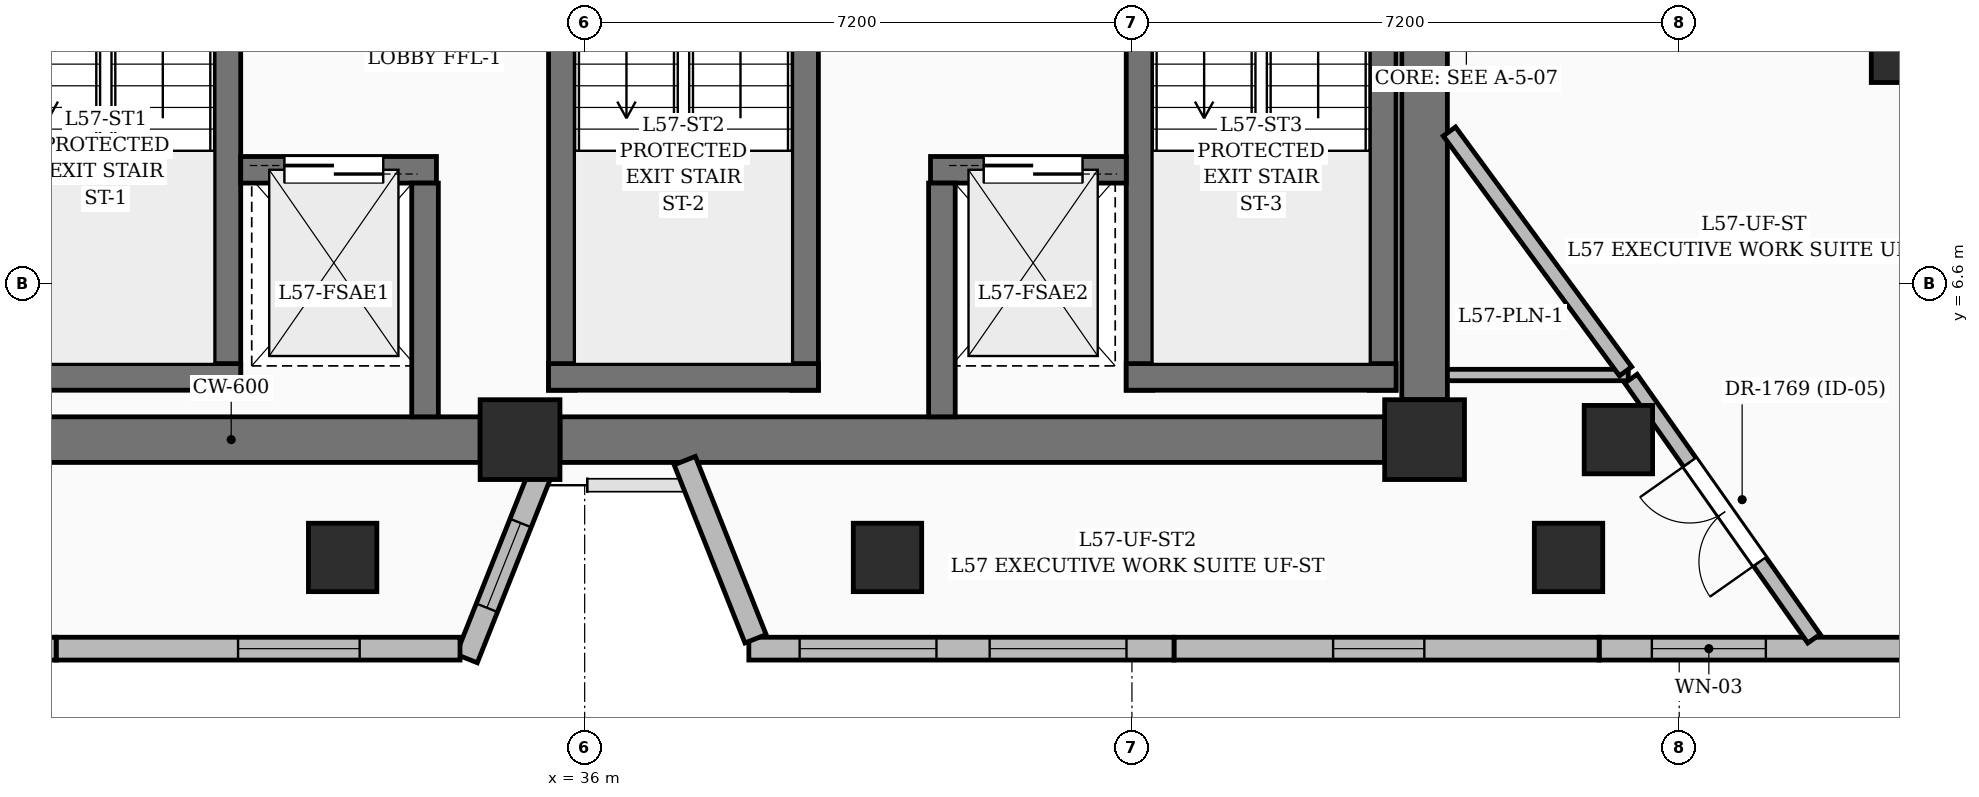
"""IFC4 building model, lengths in metres.
Left out: names, types, materials, properties, quantities, classifications, styles, units other than length and angle.
Written with IfcOpenShell. Run it as: python <this file> out.ifc"""

import sys

from ifc_helpers import new_model, si_unit, direction, frame, frame_2d, origin, origin_2d, place, context, subcontext, project, spatial, rectangle, extrude, element, fill, save


model = new_model("IFC4")
c1 = context("Model", 3, precision=1e-05, world=origin(), true_north=direction((0.0, 1.0)))
c2 = subcontext(c1, "Body", "Model", "MODEL_VIEW")
j1 = project(units=[si_unit("LENGTHUNIT", "METRE"), si_unit("PLANEANGLEUNIT", "RADIAN")], contexts=[c1])
p1 = place(None, origin())
s1 = spatial("IfcSite", under=j1, at=p1, CompositionType="ELEMENT")
p2 = place(p1, origin())
s2 = spatial("IfcBuilding", under=s1, at=p2, CompositionType="ELEMENT")
p3 = place(p2, frame((0.0, 0.0, 222.0)))
s3 = spatial("IfcBuildingStorey", under=s2, at=p3, CompositionType="ELEMENT", Elevation=222.0)
for number, where, z_axis, x_axis in (
    (1, (35.15, 4.55, 0.0), (0.0, 0.0, 1.0), (1.0, 0.0, 0.0)),
    (2, (47.05, 4.55, 0.0), (0.0, 0.0, 1.0), (1.0, 0.0, 0.0)),
):
    element("IfcColumn", number, at=place(p3, frame(where, z_axis=z_axis, x_axis=x_axis)), inside=s3, PredefinedType="COLUMN", context=c2, shape_type="SweptSolid", body=[
        extrude(rectangle(XDim=1.05, YDim=1.05, at=origin_2d()), origin(), (0.0, 0.0, 1.0), 3.75),
    ])
p4 = place(p3, frame((49.6, 4.55, 0.0), z_axis=(0.0, 0.0, 1.0), x_axis=(1.0, 0.0, 0.0)))
e3 = element("IfcColumn", 3, at=p4, inside=s3, PredefinedType="COLUMN", context=c2, shape_type="SweptSolid", body=[
    extrude(rectangle(XDim=0.9, YDim=0.9, at=origin_2d()), origin(), (0.0, 0.0, 1.0), 3.75),
])
p5 = place(p3, frame((28.075, 4.55, 0.0), z_axis=(0.0, 0.0, 1.0), x_axis=(1.0, 0.0, 0.0)))
e4 = element("IfcWall", 4, at=p5, inside=s3, PredefinedType="SHEAR", context=c2, shape_type="SweptSolid", body=[
    extrude(rectangle(XDim=6.55, YDim=0.6, at=frame_2d((3.275, 0.0))), origin(), (0.0, 0.0, 1.0), 3.75),
])
p6 = place(p3, frame((35.675, 4.55, 0.0), z_axis=(0.0, 0.0, 1.0), x_axis=(1.0, 0.0, 0.0)))
e5 = element("IfcWall", 5, at=p6, inside=s3, PredefinedType="SHEAR", context=c2, shape_type="SweptSolid", body=[
    extrude(rectangle(XDim=10.85, YDim=0.6, at=frame_2d((5.425, 0.0))), origin(), (0.0, 0.0, 1.0), 3.75),
])
p7 = place(p3, frame((47.05, 5.075, 0.0), z_axis=(0.0, 0.0, 1.0), x_axis=(0.0, 1.0, 0.0)))
e6 = element("IfcWall", 6, at=p7, inside=s3, PredefinedType="SHEAR", context=c2, shape_type="SweptSolid", body=[
    extrude(rectangle(XDim=9.15, YDim=0.6, at=frame_2d((4.575, 0.0))), origin(), (0.0, 0.0, 1.0), 3.75),
])
p8 = place(p3, frame((31.3, 5.2, 0.0), z_axis=(0.0, 0.0, 1.0), x_axis=(0.0, 1.0, 0.0)))
e7 = element("IfcWall", 7, at=p8, inside=s3, PredefinedType="SOLIDWALL", context=c2, shape_type="SweptSolid", body=[
    extrude(rectangle(XDim=9.25, YDim=0.35, at=frame_2d((4.625, 0.0))), origin(), (0.0, 0.0, 1.0), 3.75),
])
p9 = place(p8, frame((6.02, 0.0, 0.0)))
e8 = element("IfcOpeningElement", 8, at=p9, cuts=e7, PredefinedType="OPENING", context=c2, shape_type="SweptSolid", body=[
    extrude(rectangle(XDim=1.0, YDim=2.15, at=frame_2d((0.5, 1.075))), frame((0.0, 0.185, 0.0), z_axis=(0.0, -1.0, 0.0), x_axis=(1.0, 0.0, 0.0)), (0.0, 0.0, 1.0), 0.37),
])
p10 = place(p3, frame((27.925, 5.375, 0.0), z_axis=(0.0, 0.0, 1.0), x_axis=(1.0, 0.0, 0.0)))
e9 = element("IfcWall", 9, at=p10, inside=s3, PredefinedType="SOLIDWALL", context=c2, shape_type="SweptSolid", body=[
    extrude(rectangle(XDim=3.55, YDim=0.35, at=frame_2d((1.775, 0.0))), origin(), (0.0, 0.0, 1.0), 3.75),
])
p11 = place(p3, frame((35.7, 5.2, 0.0), z_axis=(0.0, 0.0, 1.0), x_axis=(0.0, 1.0, 0.0)))
e10 = element("IfcWall", 10, at=p11, inside=s3, PredefinedType="SOLIDWALL", context=c2, shape_type="SweptSolid", body=[
    extrude(rectangle(XDim=9.25, YDim=0.35, at=frame_2d((4.625, 0.0))), origin(), (0.0, 0.0, 1.0), 3.75),
])
p12 = place(p11, frame((6.02, 0.0, 0.0)))
e11 = element("IfcOpeningElement", 11, at=p12, cuts=e10, PredefinedType="OPENING", context=c2, shape_type="SweptSolid", body=[
    extrude(rectangle(XDim=1.0, YDim=2.15, at=frame_2d((0.5, 1.075))), frame((0.0, 0.185, 0.0), z_axis=(0.0, -1.0, 0.0), x_axis=(1.0, 0.0, 0.0)), (0.0, 0.0, 1.0), 0.37),
])
p13 = place(p3, frame((38.9, 5.2, 0.0), z_axis=(0.0, 0.0, 1.0), x_axis=(0.0, 1.0, 0.0)))
e12 = element("IfcWall", 12, at=p13, inside=s3, PredefinedType="SOLIDWALL", context=c2, shape_type="SweptSolid", body=[
    extrude(rectangle(XDim=9.25, YDim=0.35, at=frame_2d((4.625, 0.0))), origin(), (0.0, 0.0, 1.0), 3.75),
])
p14 = place(p13, frame((6.02, 0.0, 0.0)))
e13 = element("IfcOpeningElement", 13, at=p14, cuts=e12, PredefinedType="OPENING", context=c2, shape_type="SweptSolid", body=[
    extrude(rectangle(XDim=1.0, YDim=2.15, at=frame_2d((0.5, 1.075))), frame((0.0, 0.185, 0.0), z_axis=(0.0, -1.0, 0.0), x_axis=(1.0, 0.0, 0.0)), (0.0, 0.0, 1.0), 0.37),
])
p15 = place(p3, frame((35.525, 5.375, 0.0), z_axis=(0.0, 0.0, 1.0), x_axis=(1.0, 0.0, 0.0)))
e14 = element("IfcWall", 14, at=p15, inside=s3, PredefinedType="SOLIDWALL", context=c2, shape_type="SweptSolid", body=[
    extrude(rectangle(XDim=3.55, YDim=0.35, at=frame_2d((1.775, 0.0))), origin(), (0.0, 0.0, 1.0), 3.75),
])
p16 = place(p3, frame((43.3, 5.2, 0.0), z_axis=(0.0, 0.0, 1.0), x_axis=(0.0, 1.0, 0.0)))
e15 = element("IfcWall", 15, at=p16, inside=s3, PredefinedType="SOLIDWALL", context=c2, shape_type="SweptSolid", body=[
    extrude(rectangle(XDim=9.25, YDim=0.35, at=frame_2d((4.625, 0.0))), origin(), (0.0, 0.0, 1.0), 3.75),
])
p17 = place(p16, frame((6.02, 0.0, 0.0)))
e16 = element("IfcOpeningElement", 16, at=p17, cuts=e15, PredefinedType="OPENING", context=c2, shape_type="SweptSolid", body=[
    extrude(rectangle(XDim=1.0, YDim=2.15, at=frame_2d((0.5, 1.075))), frame((0.0, 0.185, 0.0), z_axis=(0.0, -1.0, 0.0), x_axis=(1.0, 0.0, 0.0)), (0.0, 0.0, 1.0), 0.37),
])
p18 = place(p3, frame((46.5, 5.2, 0.0), z_axis=(0.0, 0.0, 1.0), x_axis=(0.0, 1.0, 0.0)))
e17 = element("IfcWall", 17, at=p18, inside=s3, PredefinedType="SOLIDWALL", context=c2, shape_type="SweptSolid", body=[
    extrude(rectangle(XDim=9.25, YDim=0.35, at=frame_2d((4.625, 0.0))), origin(), (0.0, 0.0, 1.0), 3.75),
])
p19 = place(p3, frame((43.125, 5.375, 0.0), z_axis=(0.0, 0.0, 1.0), x_axis=(1.0, 0.0, 0.0)))
e18 = element("IfcWall", 18, at=p19, inside=s3, PredefinedType="SOLIDWALL", context=c2, shape_type="SweptSolid", body=[
    extrude(rectangle(XDim=3.55, YDim=0.35, at=frame_2d((1.775, 0.0))), origin(), (0.0, 0.0, 1.0), 3.75),
])
p20 = place(p3, frame((31.475, 8.1, 0.0), z_axis=(0.0, 0.0, 1.0), x_axis=(1.0, 0.0, 0.0)))
e19 = element("IfcWall", 19, at=p20, inside=s3, PredefinedType="SOLIDWALL", context=c2, shape_type="SweptSolid", body=[
    extrude(rectangle(XDim=2.575, YDim=0.35, at=frame_2d((1.288, 0.0))), origin(), (0.0, 0.0, 1.0), 3.75),
])
p21 = place(p20, frame((0.575, 0.0, 0.0)))
e20 = element("IfcOpeningElement", 20, at=p21, cuts=e19, PredefinedType="OPENING", context=c2, shape_type="SweptSolid", body=[
    extrude(rectangle(XDim=1.3, YDim=2.25, at=frame_2d((0.65, 1.125))), frame((0.0, 0.185, 0.0), z_axis=(0.0, -1.0, 0.0), x_axis=(1.0, 0.0, 0.0)), (0.0, 0.0, 1.0), 0.37),
])
p22 = place(p3, frame((40.55, 8.1, 0.0), z_axis=(0.0, 0.0, 1.0), x_axis=(1.0, 0.0, 0.0)))
e21 = element("IfcWall", 21, at=p22, inside=s3, PredefinedType="SOLIDWALL", context=c2, shape_type="SweptSolid", body=[
    extrude(rectangle(XDim=2.575, YDim=0.35, at=frame_2d((1.288, 0.0))), origin(), (0.0, 0.0, 1.0), 3.75),
])
p23 = place(p22, frame((0.7, 0.0, 0.0)))
e22 = element("IfcOpeningElement", 22, at=p23, cuts=e21, PredefinedType="OPENING", context=c2, shape_type="SweptSolid", body=[
    extrude(rectangle(XDim=1.3, YDim=2.25, at=frame_2d((0.65, 1.125))), frame((0.0, 0.185, 0.0), z_axis=(0.0, -1.0, 0.0), x_axis=(1.0, 0.0, 0.0)), (0.0, 0.0, 1.0), 0.37),
])
for number, where, z_axis, x_axis in (
    (23, (33.9, 4.85, 0.0), (0.0, 0.0, 1.0), (0.0, 1.0, 0.0)),
    (24, (40.7, 4.85, 0.0), (0.0, 0.0, 1.0), (0.0, 1.0, 0.0)),
):
    element("IfcWall", number, at=place(p3, frame(where, z_axis=z_axis, x_axis=x_axis)), inside=s3, PredefinedType="SOLIDWALL", context=c2, shape_type="SweptSolid", body=[
        extrude(rectangle(XDim=3.075, YDim=0.35, at=frame_2d((1.538, 0.0))), origin(), (0.0, 0.0, 1.0), 3.75),
    ])
for number, where, z_axis, x_axis in (
    (25, (32.816, 3.0, 0.0), (0.0, 0.0, 1.0), (1.0, 0.0, 0.0)),
    (26, (39.984, 3.0, 0.0), (0.0, 0.0, 1.0), (1.0, 0.0, 0.0)),
    (27, (48.944, 3.0, 0.0), (0.0, 0.0, 1.0), (1.0, 0.0, 0.0)),
    (28, (53.377, 9.698, 0.0), (0.0, 0.0, 1.0), (1.0, 0.0, 0.0)),
):
    element("IfcColumn", number, at=place(p3, frame(where, z_axis=z_axis, x_axis=x_axis)), inside=s3, PredefinedType="COLUMN", context=c2, shape_type="SweptSolid", body=[
        extrude(rectangle(XDim=0.9, YDim=0.9, at=origin_2d()), origin(), (0.0, 0.0, 1.0), 3.75),
    ])
p24 = place(p3, frame((53.369, 12.333, 0.0), z_axis=(0.0, 0.0, 1.0), x_axis=(0.45831213698, -0.888791305705, 0.0)))
e29 = element("IfcWall", 29, at=p24, inside=s3, PredefinedType="SOLIDWALL", context=c2, shape_type="SweptSolid", body=[
    extrude(rectangle(XDim=7.991, YDim=0.3, at=frame_2d((3.996, 0.0))), origin(), (0.0, 0.0, 1.0), 3.5),
])
p25 = place(p24, frame((3.05, 0.0, 0.8)))
e30 = element("IfcOpeningElement", 30, at=p25, cuts=e29, PredefinedType="OPENING", context=c2, shape_type="SweptSolid", body=[
    extrude(rectangle(XDim=1.2, YDim=1.8, at=frame_2d((0.6, 0.9))), frame((0.0, 0.16, 0.0), z_axis=(0.0, -1.0, 0.0), x_axis=(1.0, 0.0, 0.0)), (0.0, 0.0, 1.0), 0.32),
])
p26 = place(p3, frame((54.36, 1.8, 0.0), z_axis=(0.0, 0.0, 1.0), x_axis=(-1.0, 0.0, 0.0)))
e31 = element("IfcWall", 31, at=p26, inside=s3, PredefinedType="SOLIDWALL", context=c2, shape_type="SweptSolid", body=[
    extrude(rectangle(XDim=5.013, YDim=0.3, at=frame_2d((2.507, 0.0))), origin(), (0.0, 0.0, 1.0), 3.5),
])
p27 = place(p26, frame((2.82, 0.0, 0.6)))
e32 = element("IfcOpeningElement", 32, at=p27, cuts=e31, PredefinedType="OPENING", context=c2, shape_type="SweptSolid", body=[
    extrude(rectangle(XDim=1.5, YDim=2.1, at=frame_2d((0.75, 1.05))), frame((0.0, 0.16, 0.0), z_axis=(0.0, -1.0, 0.0), x_axis=(1.0, 0.0, 0.0)), (0.0, 0.0, 1.0), 0.32),
])
p28 = place(p3, frame((49.347, 1.8, 0.0), z_axis=(0.0, 0.0, 1.0), x_axis=(-1.0, 0.0, 0.0)))
e33 = element("IfcWall", 33, at=p28, inside=s3, PredefinedType="SOLIDWALL", context=c2, shape_type="SweptSolid", body=[
    extrude(rectangle(XDim=5.593, YDim=0.3, at=frame_2d((2.797, 0.0))), origin(), (0.0, 0.0, 1.0), 3.5),
])
p29 = place(p28, frame((2.3, 0.0, 0.8)))
e34 = element("IfcOpeningElement", 34, at=p29, cuts=e33, PredefinedType="OPENING", context=c2, shape_type="SweptSolid", body=[
    extrude(rectangle(XDim=1.2, YDim=1.8, at=frame_2d((0.6, 0.9))), frame((0.0, 0.16, 0.0), z_axis=(0.0, -1.0, 0.0), x_axis=(1.0, 0.0, 0.0)), (0.0, 0.0, 1.0), 0.32),
])
p30 = place(p3, frame((43.753, 1.8, 0.0), z_axis=(0.0, 0.0, 1.0), x_axis=(-1.0, 0.0, 0.0)))
e35 = element("IfcWall", 35, at=p30, inside=s3, PredefinedType="SOLIDWALL", context=c2, shape_type="SweptSolid", body=[
    extrude(rectangle(XDim=5.594, YDim=0.3, at=frame_2d((2.797, 0.0))), origin(), (0.0, 0.0, 1.0), 3.5),
])
p31 = place(p30, frame((0.625, 0.0, 0.6)))
e36 = element("IfcOpeningElement", 36, at=p31, cuts=e35, PredefinedType="OPENING", context=c2, shape_type="SweptSolid", body=[
    extrude(rectangle(XDim=1.8, YDim=2.1, at=frame_2d((0.9, 1.05))), frame((0.0, 0.16, 0.0), z_axis=(0.0, -1.0, 0.0), x_axis=(1.0, 0.0, 0.0)), (0.0, 0.0, 1.0), 0.32),
])
p32 = place(p30, frame((3.125, 0.0, 0.6)))
e37 = element("IfcOpeningElement", 37, at=p32, cuts=e35, PredefinedType="OPENING", context=c2, shape_type="SweptSolid", body=[
    extrude(rectangle(XDim=1.8, YDim=2.1, at=frame_2d((0.9, 1.05))), frame((0.0, 0.16, 0.0), z_axis=(0.0, -1.0, 0.0), x_axis=(1.0, 0.0, 0.0)), (0.0, 0.0, 1.0), 0.32),
])
p33 = place(p3, frame((38.248, 1.93, 0.0), z_axis=(0.0, 0.0, 1.0), x_axis=(-0.36953712681, 0.929215966236, 0.0)))
e38 = element("IfcWall", 38, at=p33, inside=s3, PredefinedType="SOLIDWALL", context=c2, shape_type="SweptSolid", body=[
    extrude(rectangle(XDim=2.522, YDim=0.3, at=frame_2d((1.261, 0.0))), origin(), (0.0, 0.0, 1.0), 2.69),
])
p34 = place(p3, frame((35.407, 4.08, 0.0), z_axis=(0.0, 0.0, 1.0), x_axis=(-0.369539870332, -0.929214875169, 0.0)))
e39 = element("IfcWall", 39, at=p34, inside=s3, PredefinedType="SOLIDWALL", context=c2, shape_type="SweptSolid", body=[
    extrude(rectangle(XDim=2.594, YDim=0.3, at=frame_2d((1.297, 0.0))), origin(), (0.0, 0.0, 1.0), 2.825),
])
p35 = place(p34, frame((0.675, 0.0, 0.8)))
e40 = element("IfcOpeningElement", 40, at=p35, cuts=e39, PredefinedType="OPENING", context=c2, shape_type="SweptSolid", body=[
    extrude(rectangle(XDim=1.2, YDim=1.8, at=frame_2d((0.6, 0.9))), frame((0.0, 0.16, 0.0), z_axis=(0.0, -1.0, 0.0), x_axis=(1.0, 0.0, 0.0)), (0.0, 0.0, 1.0), 0.32),
])
p36 = place(p3, frame((34.36, 1.8, 0.0), z_axis=(0.0, 0.0, 1.0), x_axis=(-1.0, 0.0, 0.0)))
e41 = element("IfcWall", 41, at=p36, inside=s3, PredefinedType="SOLIDWALL", context=c2, shape_type="SweptSolid", body=[
    extrude(rectangle(XDim=5.313, YDim=0.3, at=frame_2d((2.657, 0.0))), origin(), (0.0, 0.0, 1.0), 3.5),
])
p37 = place(p36, frame((1.32, 0.0, 0.55)))
e42 = element("IfcOpeningElement", 42, at=p37, cuts=e41, PredefinedType="OPENING", context=c2, shape_type="SweptSolid", body=[
    extrude(rectangle(XDim=1.6, YDim=2.2, at=frame_2d((0.8, 1.1))), frame((0.0, 0.16, 0.0), z_axis=(0.0, -1.0, 0.0), x_axis=(1.0, 0.0, 0.0)), (0.0, 0.0, 1.0), 0.32),
])
p38 = place(p3, frame((29.047, 1.8, 0.0), z_axis=(0.0, 0.0, 1.0), x_axis=(-1.0, 0.0, 0.0)))
e43 = element("IfcWall", 43, at=p38, inside=s3, PredefinedType="SOLIDWALL", context=c2, shape_type="SweptSolid", body=[
    extrude(rectangle(XDim=5.593, YDim=0.3, at=frame_2d((2.797, 0.0))), origin(), (0.0, 0.0, 1.0), 3.5),
])
p39 = place(p38, frame((2.9, 0.0, 0.6)))
e44 = element("IfcOpeningElement", 44, at=p39, cuts=e43, PredefinedType="OPENING", context=c2, shape_type="SweptSolid", body=[
    extrude(rectangle(XDim=1.5, YDim=2.1, at=frame_2d((0.75, 1.05))), frame((0.0, 0.16, 0.0), z_axis=(0.0, -1.0, 0.0), x_axis=(1.0, 0.0, 0.0)), (0.0, 0.0, 1.0), 0.32),
])
p40 = place(p3, frame((49.73, 5.4, 0.0), z_axis=(0.0, 0.0, 1.0), x_axis=(-1.0, 0.0, 0.0)))
e45 = element("IfcWall", 45, at=p40, inside=s3, PredefinedType="PARTITIONING", context=c2, shape_type="SweptSolid", body=[
    extrude(rectangle(XDim=2.38, YDim=0.15, at=frame_2d((1.19, 0.0))), origin(), (0.0, 0.0, 1.0), 2.685),
])
p41 = place(p3, frame((52.173, 1.932, 0.0), z_axis=(0.0, 0.0, 1.0), x_axis=(-0.575802801628, 0.817588609043, 0.0)))
e46 = element("IfcWall", 46, at=p41, inside=s3, PredefinedType="PARTITIONING", context=c2, shape_type="SweptSolid", body=[
    extrude(rectangle(XDim=4.182, YDim=0.2, at=frame_2d((2.091, 0.0))), origin(), (0.0, 0.0, 1.0), 2.82),
])
p42 = place(p41, frame((1.239, 0.0, 0.0)))
e47 = element("IfcOpeningElement", 47, at=p42, cuts=e46, PredefinedType="OPENING", context=c2, shape_type="SweptSolid", body=[
    extrude(rectangle(XDim=1.6, YDim=2.3, at=frame_2d((0.8, 1.15))), frame((0.0, 0.11, 0.0), z_axis=(0.0, -1.0, 0.0), x_axis=(1.0, 0.0, 0.0)), (0.0, 0.0, 1.0), 0.22),
])
p43 = place(p3, frame((49.695, 5.448, 0.0), z_axis=(0.0, 0.0, 1.0), x_axis=(-0.592028496227, 0.805917030255, 0.0)))
e48 = element("IfcWall", 48, at=p43, inside=s3, PredefinedType="PARTITIONING", context=c2, shape_type="SweptSolid", body=[
    extrude(rectangle(XDim=3.915, YDim=0.2, at=frame_2d((1.958, 0.0))), origin(), (0.0, 0.0, 1.0), 2.685),
])
p44 = place(p27, origin())
e49 = element("IfcWindow", 49, at=p44, inside=s3, PartitioningType="SINGLE_PANEL", PredefinedType="WINDOW", context=c2, shape_type="SweptSolid", body=[
    extrude(rectangle(XDim=1.5, YDim=2.1, at=frame_2d((0.75, 1.05))), frame((0.0, 0.03, 0.0), z_axis=(0.0, -1.0, 0.0), x_axis=(1.0, 0.0, 0.0)), (0.0, 0.0, 1.0), 0.06),
])
fill(e32, e49)
p45 = place(p29, origin())
e50 = element("IfcWindow", 50, at=p45, inside=s3, PartitioningType="SINGLE_PANEL", PredefinedType="WINDOW", context=c2, shape_type="SweptSolid", body=[
    extrude(rectangle(XDim=1.2, YDim=1.8, at=frame_2d((0.6, 0.9))), frame((0.0, 0.03, 0.0), z_axis=(0.0, -1.0, 0.0), x_axis=(1.0, 0.0, 0.0)), (0.0, 0.0, 1.0), 0.06),
])
fill(e34, e50)
p46 = place(p31, origin())
e51 = element("IfcWindow", 51, at=p46, inside=s3, PartitioningType="SINGLE_PANEL", PredefinedType="WINDOW", context=c2, shape_type="SweptSolid", body=[
    extrude(rectangle(XDim=1.8, YDim=2.1, at=frame_2d((0.9, 1.05))), frame((0.0, 0.03, 0.0), z_axis=(0.0, -1.0, 0.0), x_axis=(1.0, 0.0, 0.0)), (0.0, 0.0, 1.0), 0.06),
])
fill(e36, e51)
p47 = place(p32, origin())
e52 = element("IfcWindow", 52, at=p47, inside=s3, PartitioningType="SINGLE_PANEL", PredefinedType="WINDOW", context=c2, shape_type="SweptSolid", body=[
    extrude(rectangle(XDim=1.8, YDim=2.1, at=frame_2d((0.9, 1.05))), frame((0.0, 0.03, 0.0), z_axis=(0.0, -1.0, 0.0), x_axis=(1.0, 0.0, 0.0)), (0.0, 0.0, 1.0), 0.06),
])
fill(e37, e52)
p48 = place(p35, origin())
e53 = element("IfcWindow", 53, at=p48, inside=s3, PartitioningType="SINGLE_PANEL", PredefinedType="WINDOW", context=c2, shape_type="SweptSolid", body=[
    extrude(rectangle(XDim=1.2, YDim=1.8, at=frame_2d((0.6, 0.9))), frame((0.0, 0.03, 0.0), z_axis=(0.0, -1.0, 0.0), x_axis=(1.0, 0.0, 0.0)), (0.0, 0.0, 1.0), 0.06),
])
fill(e40, e53)
p49 = place(p37, origin())
e54 = element("IfcWindow", 54, at=p49, inside=s3, PartitioningType="SINGLE_PANEL", PredefinedType="WINDOW", context=c2, shape_type="SweptSolid", body=[
    extrude(rectangle(XDim=1.6, YDim=2.2, at=frame_2d((0.8, 1.1))), frame((0.0, 0.03, 0.0), z_axis=(0.0, -1.0, 0.0), x_axis=(1.0, 0.0, 0.0)), (0.0, 0.0, 1.0), 0.06),
])
fill(e42, e54)
p50 = place(p21, origin())
e55 = element("IfcDoor", 55, at=p50, inside=s3, OperationType="DOUBLE_DOOR_SLIDING", PredefinedType="DOOR", context=c2, shape_type="SweptSolid", body=[
    extrude(rectangle(XDim=1.3, YDim=2.25, at=frame_2d((0.65, 1.125))), frame((0.0, 0.025, 0.0), z_axis=(0.0, -1.0, 0.0), x_axis=(1.0, 0.0, 0.0)), (0.0, 0.0, 1.0), 0.05),
])
fill(e20, e55)
p51 = place(p23, origin())
e56 = element("IfcDoor", 56, at=p51, inside=s3, OperationType="DOUBLE_DOOR_SLIDING", PredefinedType="DOOR", context=c2, shape_type="SweptSolid", body=[
    extrude(rectangle(XDim=1.3, YDim=2.25, at=frame_2d((0.65, 1.125))), frame((0.0, 0.025, 0.0), z_axis=(0.0, -1.0, 0.0), x_axis=(1.0, 0.0, 0.0)), (0.0, 0.0, 1.0), 0.05),
])
fill(e22, e56)
p52 = place(p42, origin())
e57 = element("IfcDoor", 57, at=p52, inside=s3, OperationType="DOUBLE_DOOR_SINGLE_SWING", PredefinedType="DOOR", context=c2, shape_type="SweptSolid", body=[
    extrude(rectangle(XDim=1.6, YDim=2.3, at=frame_2d((0.8, 1.15))), frame((0.0, 0.025, 0.0), z_axis=(0.0, -1.0, 0.0), x_axis=(1.0, 0.0, 0.0)), (0.0, 0.0, 1.0), 0.05),
])
fill(e47, e57)
save(model, sys.argv[1])
